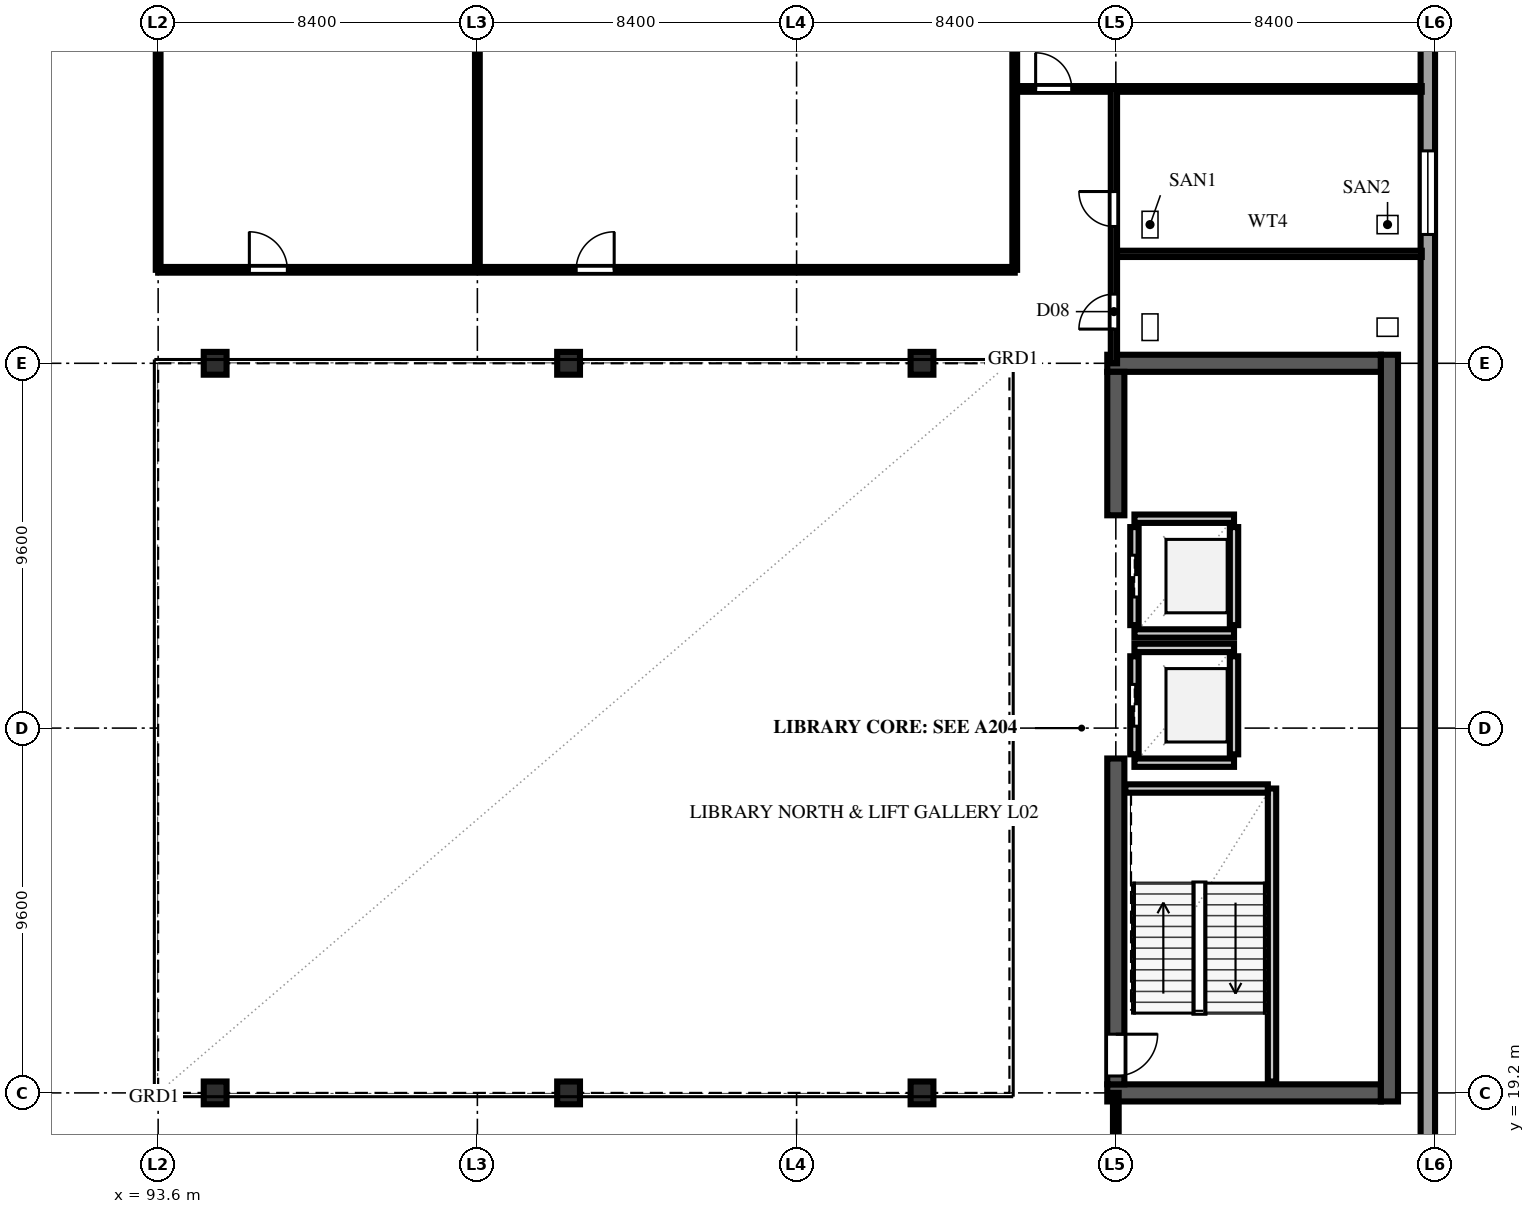
"""IFC4 building model, lengths in metres.
Left out: names, types, materials, properties, quantities, classifications, styles, units other than length and angle.
Written with IfcOpenShell. Run it as: python <this file> out.ifc"""

import sys

from ifc_helpers import new_model, si_unit, direction, frame, frame_2d, origin, origin_2d, place, context, subcontext, project, spatial, rectangle, extrude, element, fill, save


model = new_model("IFC4")
c1 = context("Model", 3, precision=1e-05, world=origin(), true_north=direction((0.0, 1.0)))
c2 = subcontext(c1, "Body", "Model", "MODEL_VIEW")
j1 = project(units=[si_unit("LENGTHUNIT", "METRE"), si_unit("PLANEANGLEUNIT", "RADIAN")], contexts=[c1])
p1 = place(None, origin())
s1 = spatial("IfcSite", under=j1, at=p1, CompositionType="ELEMENT")
p2 = place(p1, origin())
s2 = spatial("IfcBuilding", under=s1, at=p2, CompositionType="ELEMENT")
p3 = place(p2, frame((0.0, 0.0, 10.4)))
s3 = spatial("IfcBuildingStorey", under=s2, at=p3, CompositionType="ELEMENT", Elevation=10.4)
for number, where, z_axis, x_axis in (
    (1, (118.575, 19.2, 0.0), (0.0, 0.0, 1.0), (1.0, 0.0, 0.0)),
    (2, (118.575, 38.4, 0.0), (0.0, 0.0, 1.0), (1.0, 0.0, 0.0)),
):
    element("IfcWall", number, at=place(p3, frame(where, z_axis=z_axis, x_axis=x_axis)), inside=s3, PredefinedType="SHEAR", context=c2, shape_type="SweptSolid", body=[
        extrude(rectangle(XDim=7.2, YDim=0.45, at=frame_2d((3.6, 0.0))), origin(), (0.0, 0.0, 1.0), 4.25),
    ])
p4 = place(p3, frame((126.0, 18.975, 0.0), z_axis=(0.0, 0.0, 1.0), x_axis=(0.0, 1.0, 0.0)))
e3 = element("IfcWall", 3, at=p4, inside=s3, PredefinedType="SHEAR", context=c2, shape_type="SweptSolid", body=[
    extrude(rectangle(XDim=19.65, YDim=0.45, at=frame_2d((9.825, 0.0))), origin(), (0.0, 0.0, 1.0), 4.25),
])
p5 = place(p3, frame((118.8, 19.425, 0.0), z_axis=(0.0, 0.0, 1.0), x_axis=(0.0, 1.0, 0.0)))
e4 = element("IfcWall", 4, at=p5, inside=s3, PredefinedType="SHEAR", context=c2, shape_type="SweptSolid", body=[
    extrude(rectangle(XDim=8.575, YDim=0.45, at=frame_2d((4.288, 0.0))), origin(), (0.0, 0.0, 1.0), 4.25),
])
p6 = place(p5, frame((0.22, 0.0, 0.0)))
e5 = element("IfcOpeningElement", 5, at=p6, cuts=e4, PredefinedType="OPENING", context=c2, shape_type="SweptSolid", body=[
    extrude(rectangle(XDim=1.1, YDim=2.2, at=frame_2d((0.55, 1.1))), frame((0.0, 0.237, 0.0), z_axis=(0.0, -1.0, 0.0), x_axis=(1.0, 0.0, 0.0)), (0.0, 0.0, 1.0), 0.474),
])
p7 = place(p3, frame((118.8, 34.4, 0.0), z_axis=(0.0, 0.0, 1.0), x_axis=(0.0, 1.0, 0.0)))
e6 = element("IfcWall", 6, at=p7, inside=s3, PredefinedType="SHEAR", context=c2, shape_type="SweptSolid", body=[
    extrude(rectangle(XDim=3.775, YDim=0.45, at=frame_2d((1.888, 0.0))), origin(), (0.0, 0.0, 1.0), 4.25),
])
for number, where, z_axis, x_axis in (
    (7, (95.1, 19.2, 0.0), (0.0, 0.0, 1.0), (1.0, 0.0, 0.0)),
    (8, (95.1, 38.4, 0.0), (0.0, 0.0, 1.0), (1.0, 0.0, 0.0)),
    (9, (104.4, 19.2, 0.0), (0.0, 0.0, 1.0), (1.0, 0.0, 0.0)),
    (10, (104.4, 38.4, 0.0), (0.0, 0.0, 1.0), (1.0, 0.0, 0.0)),
    (11, (113.7, 19.2, 0.0), (0.0, 0.0, 1.0), (1.0, 0.0, 0.0)),
    (12, (113.7, 38.4, 0.0), (0.0, 0.0, 1.0), (1.0, 0.0, 0.0)),
):
    element("IfcColumn", number, at=place(p3, frame(where, z_axis=z_axis, x_axis=x_axis)), inside=s3, PredefinedType="COLUMN", context=c2, shape_type="SweptSolid", body=[
        extrude(rectangle(XDim=0.6, YDim=0.6, at=origin_2d()), origin(), (0.0, 0.0, 1.0), 4.6),
    ])
p8 = place(p3, frame((127.01, 0.19, 0.0), z_axis=(0.0, 0.0, 1.0), x_axis=(0.0, 1.0, 0.0)))
e13 = element("IfcWall", 13, at=p8, inside=s3, PredefinedType="SOLIDWALL", context=c2, shape_type="SweptSolid", body=[
    extrude(rectangle(XDim=57.22, YDim=0.38, at=frame_2d((28.61, 0.0))), origin(), (0.0, 0.0, 1.0), 4.25),
])
p9 = place(p8, frame((3.6, 0.0, 0.85)))
e14 = element("IfcOpeningElement", 14, at=p9, cuts=e13, PredefinedType="OPENING", context=c2, shape_type="SweptSolid", body=[
    extrude(rectangle(XDim=2.2, YDim=2.25, at=frame_2d((1.1, 1.125))), frame((0.0, 0.202, 0.0), z_axis=(0.0, -1.0, 0.0), x_axis=(1.0, 0.0, 0.0)), (0.0, 0.0, 1.0), 0.404),
])
p10 = place(p8, frame((11.2, 0.0, 0.85)))
e15 = element("IfcOpeningElement", 15, at=p10, cuts=e13, PredefinedType="OPENING", context=c2, shape_type="SweptSolid", body=[
    extrude(rectangle(XDim=2.2, YDim=2.25, at=frame_2d((1.1, 1.125))), frame((0.0, 0.202, 0.0), z_axis=(0.0, -1.0, 0.0), x_axis=(1.0, 0.0, 0.0)), (0.0, 0.0, 1.0), 0.404),
])
p11 = place(p8, frame((41.6, 0.0, 0.85)))
e16 = element("IfcOpeningElement", 16, at=p11, cuts=e13, PredefinedType="OPENING", context=c2, shape_type="SweptSolid", body=[
    extrude(rectangle(XDim=2.2, YDim=2.25, at=frame_2d((1.1, 1.125))), frame((0.0, 0.202, 0.0), z_axis=(0.0, -1.0, 0.0), x_axis=(1.0, 0.0, 0.0)), (0.0, 0.0, 1.0), 0.404),
])
p12 = place(p8, frame((49.2, 0.0, 0.85)))
e17 = element("IfcOpeningElement", 17, at=p12, cuts=e13, PredefinedType="OPENING", context=c2, shape_type="SweptSolid", body=[
    extrude(rectangle(XDim=2.2, YDim=2.25, at=frame_2d((1.1, 1.125))), frame((0.0, 0.202, 0.0), z_axis=(0.0, -1.0, 0.0), x_axis=(1.0, 0.0, 0.0)), (0.0, 0.0, 1.0), 0.404),
])
p13 = place(p3, frame((122.91, 19.5, 0.0), z_axis=(0.0, 0.0, 1.0), x_axis=(0.0, 1.0, 0.0)))
e18 = element("IfcWall", 18, at=p13, inside=s3, PredefinedType="SOLIDWALL", context=c2, shape_type="SweptSolid", body=[
    extrude(rectangle(XDim=7.71, YDim=0.22, at=frame_2d((3.855, 0.0))), origin(), (0.0, 0.0, 1.0), 4.25),
])
p14 = place(p3, frame((119.05, 27.21, 0.0), z_axis=(0.0, 0.0, 1.0), x_axis=(1.0, 0.0, 0.0)))
e19 = element("IfcWall", 19, at=p14, inside=s3, PredefinedType="SOLIDWALL", context=c2, shape_type="SweptSolid", body=[
    extrude(rectangle(XDim=3.75, YDim=0.22, at=frame_2d((1.875, 0.0))), origin(), (0.0, 0.0, 1.0), 4.25),
])
p15 = place(p3, frame((119.29, 28.11, 0.0), z_axis=(0.0, 0.0, 1.0), x_axis=(0.0, 1.0, 0.0)))
e20 = element("IfcWall", 20, at=p15, inside=s3, PredefinedType="SOLIDWALL", context=c2, shape_type="SweptSolid", body=[
    extrude(rectangle(XDim=2.58, YDim=0.22, at=frame_2d((1.29, 0.0))), origin(), (0.0, 0.0, 1.0), 4.25),
])
p16 = place(p15, frame((0.74, 0.0, 0.0)))
e21 = element("IfcOpeningElement", 21, at=p16, cuts=e20, PredefinedType="OPENING", context=c2, shape_type="SweptSolid", body=[
    extrude(rectangle(XDim=1.1, YDim=2.2, at=frame_2d((0.55, 1.1))), frame((0.0, 0.122, 0.0), z_axis=(0.0, -1.0, 0.0), x_axis=(1.0, 0.0, 0.0)), (0.0, 0.0, 1.0), 0.244),
])
p17 = place(p3, frame((121.91, 28.11, 0.0), z_axis=(0.0, 0.0, 1.0), x_axis=(0.0, 1.0, 0.0)))
e22 = element("IfcWall", 22, at=p17, inside=s3, PredefinedType="SOLIDWALL", context=c2, shape_type="SweptSolid", body=[
    extrude(rectangle(XDim=2.58, YDim=0.22, at=frame_2d((1.29, 0.0))), origin(), (0.0, 0.0, 1.0), 4.25),
])
for number, where, z_axis, x_axis in (
    (23, (119.29, 27.89, 0.0), (0.0, 0.0, 1.0), (1.0, 0.0, 0.0)),
    (24, (119.29, 30.91, 0.0), (0.0, 0.0, 1.0), (1.0, 0.0, 0.0)),
):
    element("IfcWall", number, at=place(p3, frame(where, z_axis=z_axis, x_axis=x_axis)), inside=s3, PredefinedType="SOLIDWALL", context=c2, shape_type="SweptSolid", body=[
        extrude(rectangle(XDim=2.62, YDim=0.22, at=frame_2d((1.31, 0.0))), origin(), (0.0, 0.0, 1.0), 4.25),
    ])
p18 = place(p3, frame((119.29, 31.51, 0.0), z_axis=(0.0, 0.0, 1.0), x_axis=(0.0, 1.0, 0.0)))
e25 = element("IfcWall", 25, at=p18, inside=s3, PredefinedType="SOLIDWALL", context=c2, shape_type="SweptSolid", body=[
    extrude(rectangle(XDim=2.58, YDim=0.22, at=frame_2d((1.29, 0.0))), origin(), (0.0, 0.0, 1.0), 4.25),
])
p19 = place(p18, frame((0.74, 0.0, 0.0)))
e26 = element("IfcOpeningElement", 26, at=p19, cuts=e25, PredefinedType="OPENING", context=c2, shape_type="SweptSolid", body=[
    extrude(rectangle(XDim=1.1, YDim=2.2, at=frame_2d((0.55, 1.1))), frame((0.0, 0.122, 0.0), z_axis=(0.0, -1.0, 0.0), x_axis=(1.0, 0.0, 0.0)), (0.0, 0.0, 1.0), 0.244),
])
p20 = place(p3, frame((121.91, 31.51, 0.0), z_axis=(0.0, 0.0, 1.0), x_axis=(0.0, 1.0, 0.0)))
e27 = element("IfcWall", 27, at=p20, inside=s3, PredefinedType="SOLIDWALL", context=c2, shape_type="SweptSolid", body=[
    extrude(rectangle(XDim=2.58, YDim=0.22, at=frame_2d((1.29, 0.0))), origin(), (0.0, 0.0, 1.0), 4.25),
])
for number, where, z_axis, x_axis in (
    (28, (119.29, 31.29, 0.0), (0.0, 0.0, 1.0), (1.0, 0.0, 0.0)),
    (29, (119.29, 34.31, 0.0), (0.0, 0.0, 1.0), (1.0, 0.0, 0.0)),
):
    element("IfcWall", number, at=place(p3, frame(where, z_axis=z_axis, x_axis=x_axis)), inside=s3, PredefinedType="SOLIDWALL", context=c2, shape_type="SweptSolid", body=[
        extrude(rectangle(XDim=2.62, YDim=0.22, at=frame_2d((1.31, 0.0))), origin(), (0.0, 0.0, 1.0), 4.25),
    ])
p21 = place(p3, frame((118.8, 16.74, 0.0), z_axis=(0.0, 0.0, 1.0), x_axis=(0.0, 1.0, 0.0)))
e30 = element("IfcWall", 30, at=p21, inside=s3, PredefinedType="PARTITIONING", context=c2, shape_type="SweptSolid", body=[
    extrude(rectangle(XDim=2.46, YDim=0.15, at=frame_2d((1.23, 0.0))), origin(), (0.0, 0.0, 1.0), 4.25),
])
for number, where, z_axis, x_axis in (
    (31, (93.6, 40.86, 0.0), (0.0, 0.0, 1.0), (0.0, 1.0, 0.0)),
    (32, (102.0, 40.86, 0.0), (0.0, 0.0, 1.0), (0.0, 1.0, 0.0)),
    (33, (116.14, 40.86, 0.0), (0.0, 0.0, 1.0), (0.0, 1.0, 0.0)),
):
    element("IfcWall", number, at=place(p3, frame(where, z_axis=z_axis, x_axis=x_axis)), inside=s3, PredefinedType="PARTITIONING", context=c2, shape_type="SweptSolid", body=[
        extrude(rectangle(XDim=16.39, YDim=0.125, at=frame_2d((8.195, 0.0))), origin(), (0.0, 0.0, 1.0), 4.25),
    ])
p22 = place(p3, frame((93.6, 40.86, 0.0), z_axis=(0.0, 0.0, 1.0), x_axis=(1.0, 0.0, 0.0)))
e34 = element("IfcWall", 34, at=p22, inside=s3, PredefinedType="PARTITIONING", context=c2, shape_type="SweptSolid", body=[
    extrude(rectangle(XDim=22.54, YDim=0.15, at=frame_2d((11.27, 0.0))), origin(), (0.0, 0.0, 1.0), 4.25),
])
p23 = place(p22, frame((2.4, 0.0, 0.0)))
e35 = element("IfcOpeningElement", 35, at=p23, cuts=e34, PredefinedType="OPENING", context=c2, shape_type="SweptSolid", body=[
    extrude(rectangle(XDim=1.0, YDim=2.2, at=frame_2d((0.5, 1.1))), frame((0.0, 0.087, 0.0), z_axis=(0.0, -1.0, 0.0), x_axis=(1.0, 0.0, 0.0)), (0.0, 0.0, 1.0), 0.174),
])
p24 = place(p22, frame((11.0, 0.0, 0.0)))
e36 = element("IfcOpeningElement", 36, at=p24, cuts=e34, PredefinedType="OPENING", context=c2, shape_type="SweptSolid", body=[
    extrude(rectangle(XDim=1.0, YDim=2.2, at=frame_2d((0.5, 1.1))), frame((0.0, 0.087, 0.0), z_axis=(0.0, -1.0, 0.0), x_axis=(1.0, 0.0, 0.0)), (0.0, 0.0, 1.0), 0.174),
])
p25 = place(p3, frame((118.75, 41.28, 0.0), z_axis=(0.0, 0.0, 1.0), x_axis=(1.0, 0.0, 0.0)))
e37 = element("IfcWall", 37, at=p25, inside=s3, PredefinedType="PLUMBINGWALL", context=c2, shape_type="SweptSolid", body=[
    extrude(rectangle(XDim=8.1, YDim=0.165, at=frame_2d((4.05, 0.0))), origin(), (0.0, 0.0, 1.0), 4.25),
])
p26 = place(p3, frame((116.14, 45.62, 0.0), z_axis=(0.0, 0.0, 1.0), x_axis=(1.0, 0.0, 0.0)))
e38 = element("IfcWall", 38, at=p26, inside=s3, PredefinedType="PARTITIONING", context=c2, shape_type="SweptSolid", body=[
    extrude(rectangle(XDim=10.71, YDim=0.15, at=frame_2d((5.355, 0.0))), origin(), (0.0, 0.0, 1.0), 4.25),
])
p27 = place(p26, frame((0.55, 0.0, 0.0)))
e39 = element("IfcOpeningElement", 39, at=p27, cuts=e38, PredefinedType="OPENING", context=c2, shape_type="SweptSolid", body=[
    extrude(rectangle(XDim=0.95, YDim=2.15, at=frame_2d((0.475, 1.075))), frame((0.0, 0.087, 0.0), z_axis=(0.0, -1.0, 0.0), x_axis=(1.0, 0.0, 0.0)), (0.0, 0.0, 1.0), 0.174),
])
p28 = place(p3, frame((118.75, 38.4, 0.0), z_axis=(0.0, 0.0, 1.0), x_axis=(0.0, 1.0, 0.0)))
e40 = element("IfcWall", 40, at=p28, inside=s3, PredefinedType="PLUMBINGWALL", context=c2, shape_type="SweptSolid", body=[
    extrude(rectangle(XDim=7.22, YDim=0.165, at=frame_2d((3.61, 0.0))), origin(), (0.0, 0.0, 1.0), 4.25),
])
p29 = place(p28, frame((0.9, 0.0, 0.0)))
e41 = element("IfcOpeningElement", 41, at=p29, cuts=e40, PredefinedType="OPENING", context=c2, shape_type="SweptSolid", body=[
    extrude(rectangle(XDim=0.92, YDim=2.15, at=frame_2d((0.46, 1.075))), frame((0.0, 0.094, 0.0), z_axis=(0.0, -1.0, 0.0), x_axis=(1.0, 0.0, 0.0)), (0.0, 0.0, 1.0), 0.189),
])
p30 = place(p28, frame((3.6, 0.0, 0.0)))
e42 = element("IfcOpeningElement", 42, at=p30, cuts=e40, PredefinedType="OPENING", context=c2, shape_type="SweptSolid", body=[
    extrude(rectangle(XDim=0.92, YDim=2.15, at=frame_2d((0.46, 1.075))), frame((0.0, 0.094, 0.0), z_axis=(0.0, -1.0, 0.0), x_axis=(1.0, 0.0, 0.0)), (0.0, 0.0, 1.0), 0.189),
])
p31 = place(p11, origin())
e43 = element("IfcWindow", 43, at=p31, inside=s3, PartitioningType="DOUBLE_PANEL_VERTICAL", PredefinedType="WINDOW", context=c2, shape_type="SweptSolid", body=[
    extrude(rectangle(XDim=2.2, YDim=2.25, at=frame_2d((1.1, 1.125))), frame((0.0, 0.11, 0.0), z_axis=(0.0, -1.0, 0.0), x_axis=(1.0, 0.0, 0.0)), (0.0, 0.0, 1.0), 0.06),
])
fill(e16, e43)
p32 = place(p6, frame((1.1, 0.0, 0.0), z_axis=(0.0, 0.0, 1.0), x_axis=(-1.0, 0.0, 0.0)))
e44 = element("IfcDoor", 44, at=p32, inside=s3, OperationType="SINGLE_SWING_LEFT", PredefinedType="DOOR", context=c2, shape_type="SweptSolid", body=[
    extrude(rectangle(XDim=1.1, YDim=2.2, at=frame_2d((0.55, 1.1))), frame((0.0, 0.025, 0.0), z_axis=(0.0, -1.0, 0.0), x_axis=(1.0, 0.0, 0.0)), (0.0, 0.0, 1.0), 0.05),
])
fill(e5, e44)
p33 = place(p16, origin())
e45 = element("IfcDoor", 45, at=p33, inside=s3, OperationType="DOUBLE_DOOR_SLIDING", PredefinedType="DOOR", context=c2, shape_type="SweptSolid", body=[
    extrude(rectangle(XDim=1.1, YDim=2.2, at=frame_2d((0.55, 1.1))), frame((0.0, 0.025, 0.0), z_axis=(0.0, -1.0, 0.0), x_axis=(1.0, 0.0, 0.0)), (0.0, 0.0, 1.0), 0.05),
])
fill(e21, e45)
p34 = place(p19, origin())
e46 = element("IfcDoor", 46, at=p34, inside=s3, OperationType="DOUBLE_DOOR_SLIDING", PredefinedType="DOOR", context=c2, shape_type="SweptSolid", body=[
    extrude(rectangle(XDim=1.1, YDim=2.2, at=frame_2d((0.55, 1.1))), frame((0.0, 0.025, 0.0), z_axis=(0.0, -1.0, 0.0), x_axis=(1.0, 0.0, 0.0)), (0.0, 0.0, 1.0), 0.05),
])
fill(e26, e46)
p35 = place(p23, origin())
e47 = element("IfcDoor", 47, at=p35, inside=s3, OperationType="SINGLE_SWING_LEFT", PredefinedType="DOOR", context=c2, shape_type="SweptSolid", body=[
    extrude(rectangle(XDim=1.0, YDim=2.2, at=frame_2d((0.5, 1.1))), frame((0.0, 0.025, 0.0), z_axis=(0.0, -1.0, 0.0), x_axis=(1.0, 0.0, 0.0)), (0.0, 0.0, 1.0), 0.05),
])
fill(e35, e47)
p36 = place(p24, origin())
e48 = element("IfcDoor", 48, at=p36, inside=s3, OperationType="SINGLE_SWING_RIGHT", PredefinedType="DOOR", context=c2, shape_type="SweptSolid", body=[
    extrude(rectangle(XDim=1.0, YDim=2.2, at=frame_2d((0.5, 1.1))), frame((0.0, 0.025, 0.0), z_axis=(0.0, -1.0, 0.0), x_axis=(1.0, 0.0, 0.0)), (0.0, 0.0, 1.0), 0.05),
])
fill(e36, e48)
p37 = place(p27, origin())
e49 = element("IfcDoor", 49, at=p37, inside=s3, OperationType="SINGLE_SWING_LEFT", PredefinedType="DOOR", context=c2, shape_type="SweptSolid", body=[
    extrude(rectangle(XDim=0.95, YDim=2.15, at=frame_2d((0.475, 1.075))), frame((0.0, 0.025, 0.0), z_axis=(0.0, -1.0, 0.0), x_axis=(1.0, 0.0, 0.0)), (0.0, 0.0, 1.0), 0.05),
])
fill(e39, e49)
p38 = place(p29, origin())
e50 = element("IfcDoor", 50, at=p38, inside=s3, OperationType="SINGLE_SWING_LEFT", PredefinedType="DOOR", context=c2, shape_type="SweptSolid", body=[
    extrude(rectangle(XDim=0.92, YDim=2.15, at=frame_2d((0.46, 1.075))), frame((0.0, 0.025, 0.0), z_axis=(0.0, -1.0, 0.0), x_axis=(1.0, 0.0, 0.0)), (0.0, 0.0, 1.0), 0.05),
])
fill(e41, e50)
p39 = place(p30, origin())
e51 = element("IfcDoor", 51, at=p39, inside=s3, OperationType="SINGLE_SWING_RIGHT", PredefinedType="DOOR", context=c2, shape_type="SweptSolid", body=[
    extrude(rectangle(XDim=0.92, YDim=2.15, at=frame_2d((0.46, 1.075))), frame((0.0, 0.025, 0.0), z_axis=(0.0, -1.0, 0.0), x_axis=(1.0, 0.0, 0.0)), (0.0, 0.0, 1.0), 0.05),
])
fill(e42, e51)
save(model, sys.argv[1])
